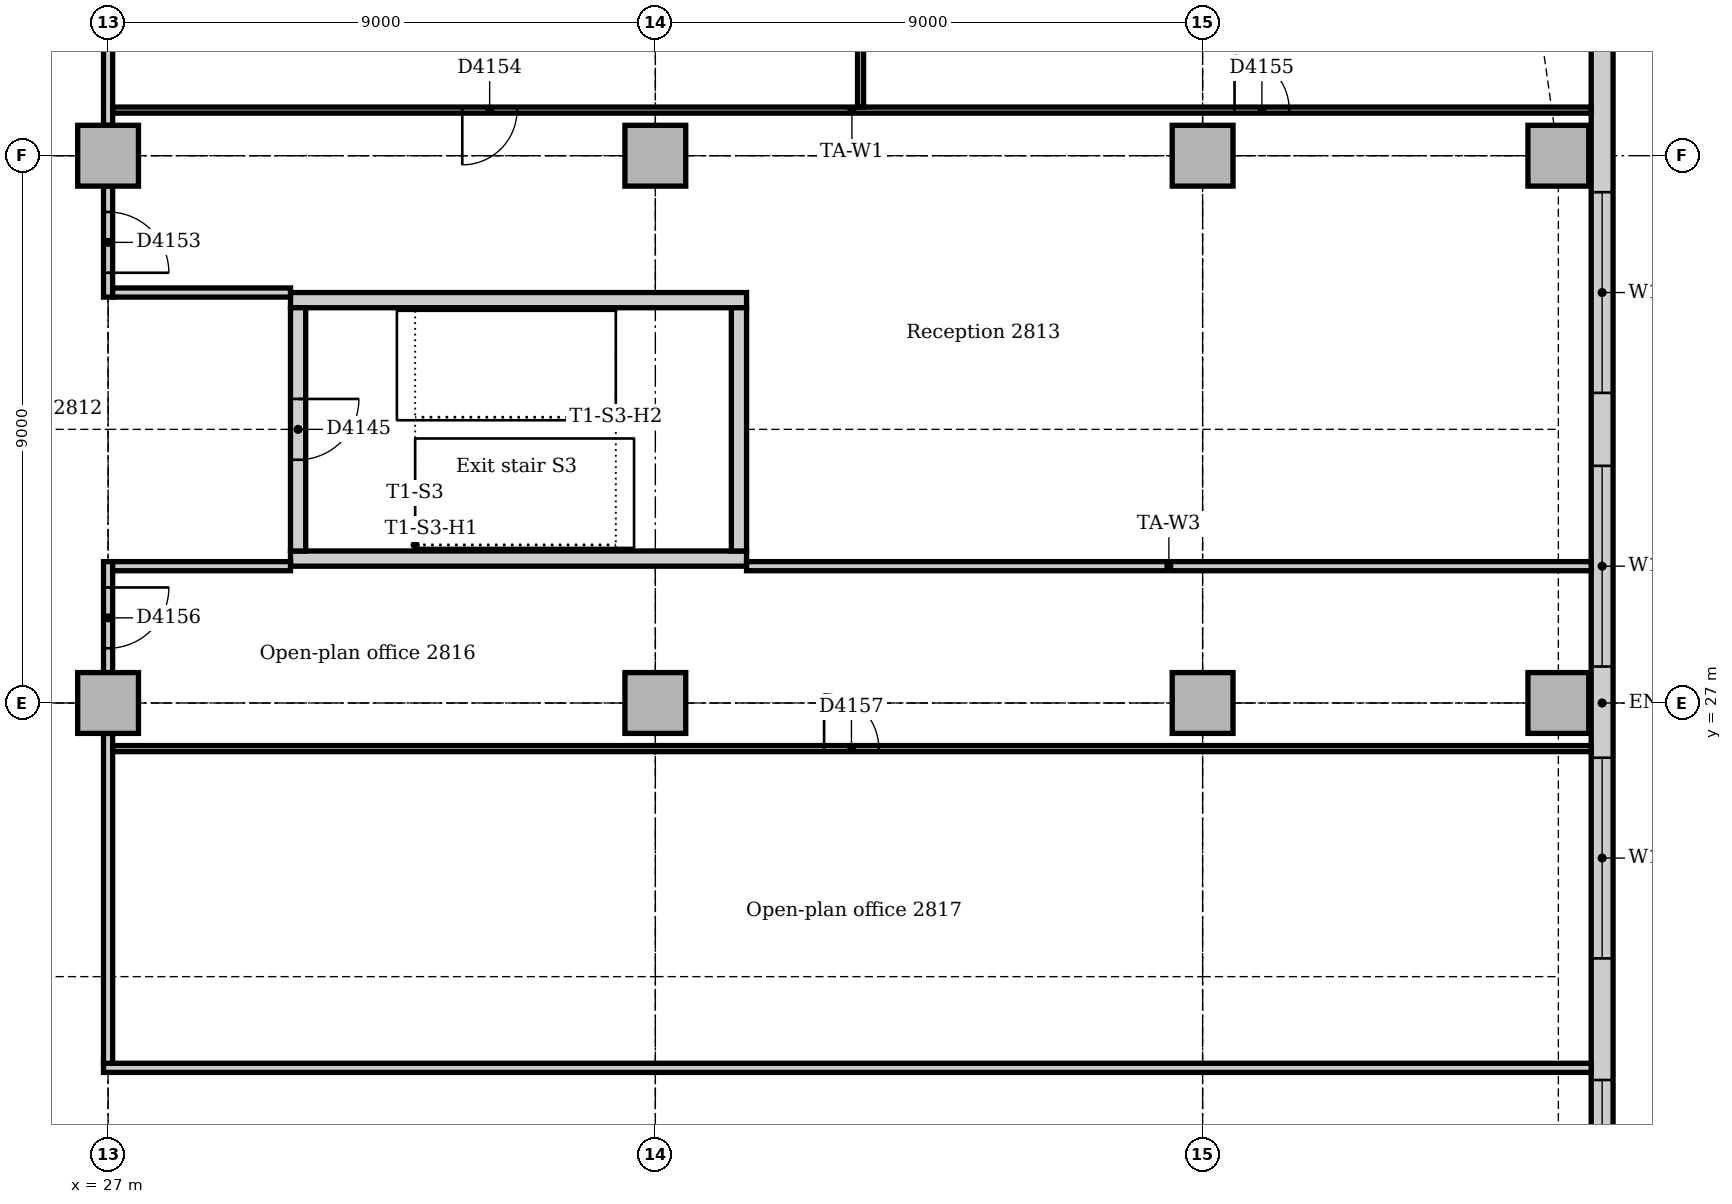
"""IFC4 building model, lengths in metres.
Left out: names, types, materials, properties, quantities, classifications, styles, units other than length and angle.
Written with IfcOpenShell. Run it as: python <this file> out.ifc"""

import sys

from ifc_helpers import new_model, si_unit, direction, frame, frame_2d, origin, origin_2d, place, context, subcontext, project, spatial, rectangle, extrude, element, fill, save


model = new_model("IFC4")
c1 = context("Model", 3, precision=1e-05, world=origin(), true_north=direction((0.0, 1.0)))
c2 = subcontext(c1, "Body", "Model", "MODEL_VIEW")
j1 = project(units=[si_unit("LENGTHUNIT", "METRE"), si_unit("PLANEANGLEUNIT", "RADIAN")], contexts=[c1])
p1 = place(None, origin())
s1 = spatial("IfcSite", under=j1, at=p1, CompositionType="ELEMENT")
p2 = place(p1, origin())
s2 = spatial("IfcBuilding", under=s1, at=p2, CompositionType="ELEMENT")
p3 = place(p2, frame((0.0, 0.0, 120.0)))
s3 = spatial("IfcBuildingStorey", under=s2, at=p3, CompositionType="ELEMENT", Elevation=120.0)
for number, where, z_axis, x_axis in (
    (1, (30.0, 29.375, 0.0), (0.0, 0.0, 1.0), (1.0, 0.0, 0.0)),
    (2, (37.5, 33.625, 0.0), (0.0, 0.0, 1.0), (-1.0, 0.0, 0.0)),
):
    element("IfcWall", number, at=place(p3, frame(where, z_axis=z_axis, x_axis=x_axis)), inside=s3, PredefinedType="SOLIDWALL", context=c2, shape_type="SweptSolid", body=[
        extrude(rectangle(XDim=7.5, YDim=0.25, at=frame_2d((3.75, 0.0))), origin(), (0.0, 0.0, 1.0), 4.0),
    ])
p4 = place(p3, frame((37.375, 29.5, 0.0), z_axis=(0.0, 0.0, 1.0), x_axis=(0.0, 1.0, 0.0)))
e3 = element("IfcWall", 3, at=p4, inside=s3, PredefinedType="SOLIDWALL", context=c2, shape_type="SweptSolid", body=[
    extrude(rectangle(XDim=4.0, YDim=0.25, at=frame_2d((2.0, 0.0))), origin(), (0.0, 0.0, 1.0), 4.0),
])
p5 = place(p3, frame((30.125, 33.5, 0.0), z_axis=(0.0, 0.0, 1.0), x_axis=(0.0, -1.0, 0.0)))
e4 = element("IfcWall", 4, at=p5, inside=s3, PredefinedType="SOLIDWALL", context=c2, shape_type="SweptSolid", body=[
    extrude(rectangle(XDim=4.0, YDim=0.25, at=frame_2d((2.0, 0.0))), origin(), (0.0, 0.0, 1.0), 4.0),
])
p6 = place(p5, frame((1.5, 0.0, 0.0)))
e5 = element("IfcOpeningElement", 5, at=p6, cuts=e4, PredefinedType="OPENING", context=c2, shape_type="SweptSolid", body=[
    extrude(rectangle(XDim=1.0, YDim=2.1, at=frame_2d((0.5, 1.05))), frame((0.0, 0.135, 0.0), z_axis=(0.0, -1.0, 0.0), x_axis=(1.0, 0.0, 0.0)), (0.0, 0.0, 1.0), 0.27),
])
for number, where, z_axis, x_axis in (
    (6, (50.85, 27.0, 0.0), (0.0, 0.0, 1.0), (1.0, 0.0, 0.0)),
    (7, (50.85, 36.0, 0.0), (0.0, 0.0, 1.0), (1.0, 0.0, 0.0)),
    (8, (27.0, 27.0, 0.0), (0.0, 0.0, 1.0), (1.0, 0.0, 0.0)),
    (9, (27.0, 36.0, 0.0), (0.0, 0.0, 1.0), (1.0, 0.0, 0.0)),
    (10, (36.0, 27.0, 0.0), (0.0, 0.0, 1.0), (1.0, 0.0, 0.0)),
    (11, (36.0, 36.0, 0.0), (0.0, 0.0, 1.0), (1.0, 0.0, 0.0)),
    (12, (45.0, 27.0, 0.0), (0.0, 0.0, 1.0), (1.0, 0.0, 0.0)),
    (13, (45.0, 36.0, 0.0), (0.0, 0.0, 1.0), (1.0, 0.0, 0.0)),
):
    element("IfcColumn", number, at=place(p3, frame(where, z_axis=z_axis, x_axis=x_axis)), inside=s3, PredefinedType="COLUMN", context=c2, shape_type="SweptSolid", body=[
        extrude(rectangle(XDim=1.0, YDim=1.0, at=origin_2d()), origin(), (0.0, 0.0, 1.0), 3.85),
    ])
p7 = place(p3, frame((51.57, 14.743, 0.0), z_axis=(0.0, 0.0, 1.0), x_axis=(0.0, 1.0, 0.0)))
e14 = element("IfcWall", 14, at=p7, inside=s3, PredefinedType="STANDARD", context=c2, shape_type="SweptSolid", body=[
    extrude(rectangle(XDim=24.515, YDim=0.36, at=frame_2d((12.257, 0.0))), origin(), (0.0, 0.0, 1.0), 3.85),
])
p8 = place(p7, frame((4.257, 0.0, 0.9)))
e15 = element("IfcOpeningElement", 15, at=p8, cuts=e14, PredefinedType="OPENING", context=c2, shape_type="SweptSolid", body=[
    extrude(rectangle(XDim=1.8, YDim=1.6, at=frame_2d((0.9, 0.8))), frame((0.0, 0.19, 0.0), z_axis=(0.0, -1.0, 0.0), x_axis=(1.0, 0.0, 0.0)), (0.0, 0.0, 1.0), 0.38),
])
p9 = place(p7, frame((8.057, 0.0, 0.9)))
e16 = element("IfcOpeningElement", 16, at=p9, cuts=e14, PredefinedType="OPENING", context=c2, shape_type="SweptSolid", body=[
    extrude(rectangle(XDim=3.3, YDim=1.6, at=frame_2d((1.65, 0.8))), frame((0.0, 0.19, 0.0), z_axis=(0.0, -1.0, 0.0), x_axis=(1.0, 0.0, 0.0)), (0.0, 0.0, 1.0), 0.38),
])
p10 = place(p7, frame((12.857, 0.0, 0.9)))
e17 = element("IfcOpeningElement", 17, at=p10, cuts=e14, PredefinedType="OPENING", context=c2, shape_type="SweptSolid", body=[
    extrude(rectangle(XDim=3.3, YDim=1.6, at=frame_2d((1.65, 0.8))), frame((0.0, 0.19, 0.0), z_axis=(0.0, -1.0, 0.0), x_axis=(1.0, 0.0, 0.0)), (0.0, 0.0, 1.0), 0.38),
])
p11 = place(p7, frame((17.357, 0.0, 0.9)))
e18 = element("IfcOpeningElement", 18, at=p11, cuts=e14, PredefinedType="OPENING", context=c2, shape_type="SweptSolid", body=[
    extrude(rectangle(XDim=3.3, YDim=1.6, at=frame_2d((1.65, 0.8))), frame((0.0, 0.19, 0.0), z_axis=(0.0, -1.0, 0.0), x_axis=(1.0, 0.0, 0.0)), (0.0, 0.0, 1.0), 0.38),
])
p12 = place(p3, frame((26.925, 21.0, 0.0), z_axis=(0.0, 0.0, 1.0), x_axis=(1.0, 0.0, 0.0)))
e19 = element("IfcWall", 19, at=p12, inside=s3, PredefinedType="PARTITIONING", context=c2, shape_type="SweptSolid", body=[
    extrude(rectangle(XDim=24.465, YDim=0.15, at=frame_2d((12.232, 0.0))), origin(), (0.0, 0.0, 1.0), 3.85),
])
p13 = place(p3, frame((27.0, 33.675, 0.0), z_axis=(0.0, 0.0, 1.0), x_axis=(0.0, 1.0, 0.0)))
e20 = element("IfcWall", 20, at=p13, inside=s3, PredefinedType="PARTITIONING", context=c2, shape_type="SweptSolid", body=[
    extrude(rectangle(XDim=1.825, YDim=0.15, at=frame_2d((0.912, 0.0))), origin(), (0.0, 0.0, 1.0), 3.256),
])
p14 = place(p13, frame((0.4, 0.0, 0.0)))
e21 = element("IfcOpeningElement", 21, at=p14, cuts=e20, PredefinedType="OPENING", context=c2, shape_type="SweptSolid", body=[
    extrude(rectangle(XDim=1.0, YDim=2.1, at=frame_2d((0.5, 1.05))), frame((0.0, 0.085, 0.0), z_axis=(0.0, -1.0, 0.0), x_axis=(1.0, 0.0, 0.0)), (0.0, 0.0, 1.0), 0.17),
])
p15 = place(p3, frame((27.0, 36.5, 0.0), z_axis=(0.0, 0.0, 1.0), x_axis=(0.0, 1.0, 0.0)))
e22 = element("IfcWall", 22, at=p15, inside=s3, PredefinedType="PARTITIONING", context=c2, shape_type="SweptSolid", body=[
    extrude(rectangle(XDim=7.1, YDim=0.15, at=frame_2d((3.55, 0.0))), origin(), (0.0, 0.0, 1.0), 3.256),
])
p16 = place(p3, frame((27.0, 21.075, 0.0), z_axis=(0.0, 0.0, 1.0), x_axis=(0.0, 1.0, 0.0)))
e23 = element("IfcWall", 23, at=p16, inside=s3, PredefinedType="PARTITIONING", context=c2, shape_type="SweptSolid", body=[
    extrude(rectangle(XDim=5.425, YDim=0.15, at=frame_2d((2.712, 0.0))), origin(), (0.0, 0.0, 1.0), 3.256),
])
p17 = place(p3, frame((27.0, 27.5, 0.0), z_axis=(0.0, 0.0, 1.0), x_axis=(0.0, 1.0, 0.0)))
e24 = element("IfcWall", 24, at=p17, inside=s3, PredefinedType="PARTITIONING", context=c2, shape_type="SweptSolid", body=[
    extrude(rectangle(XDim=1.825, YDim=0.15, at=frame_2d((0.912, 0.0))), origin(), (0.0, 0.0, 1.0), 3.256),
])
p18 = place(p17, frame((0.4, 0.0, 0.0)))
e25 = element("IfcOpeningElement", 25, at=p18, cuts=e24, PredefinedType="OPENING", context=c2, shape_type="SweptSolid", body=[
    extrude(rectangle(XDim=1.0, YDim=2.1, at=frame_2d((0.5, 1.05))), frame((0.0, 0.085, 0.0), z_axis=(0.0, -1.0, 0.0), x_axis=(1.0, 0.0, 0.0)), (0.0, 0.0, 1.0), 0.17),
])
for number, where, z_axis, x_axis in (
    (26, (27.075, 29.25, 0.0), (0.0, 0.0, 1.0), (1.0, 0.0, 0.0)),
    (27, (27.075, 33.75, 0.0), (0.0, 0.0, 1.0), (1.0, 0.0, 0.0)),
):
    element("IfcWall", number, at=place(p3, frame(where, z_axis=z_axis, x_axis=x_axis)), inside=s3, PredefinedType="PARTITIONING", context=c2, shape_type="SweptSolid", body=[
        extrude(rectangle(XDim=2.925, YDim=0.15, at=frame_2d((1.462, 0.0))), origin(), (0.0, 0.0, 1.0), 3.85),
    ])
p19 = place(p3, frame((37.5, 29.25, 0.0), z_axis=(0.0, 0.0, 1.0), x_axis=(1.0, 0.0, 0.0)))
e28 = element("IfcWall", 28, at=p19, inside=s3, PredefinedType="PARTITIONING", context=c2, shape_type="SweptSolid", body=[
    extrude(rectangle(XDim=13.89, YDim=0.15, at=frame_2d((6.945, 0.0))), origin(), (0.0, 0.0, 1.0), 3.85),
])
p20 = place(p3, frame((27.075, 26.25, 0.0), z_axis=(0.0, 0.0, 1.0), x_axis=(1.0, 0.0, 0.0)))
e29 = element("IfcWall", 29, at=p20, inside=s3, PredefinedType="PARTITIONING", context=c2, shape_type="SweptSolid", body=[
    extrude(rectangle(XDim=24.315, YDim=0.1, at=frame_2d((12.158, 0.0))), origin(), (0.0, 0.0, 1.0), 3.85),
])
p21 = place(p20, frame((11.7, 0.0, 0.0)))
e30 = element("IfcOpeningElement", 30, at=p21, cuts=e29, PredefinedType="OPENING", context=c2, shape_type="SweptSolid", body=[
    extrude(rectangle(XDim=0.9, YDim=2.1, at=frame_2d((0.45, 1.05))), frame((0.0, 0.06, 0.0), z_axis=(0.0, -1.0, 0.0), x_axis=(1.0, 0.0, 0.0)), (0.0, 0.0, 1.0), 0.12),
])
p22 = place(p3, frame((27.075, 36.75, 0.0), z_axis=(0.0, 0.0, 1.0), x_axis=(1.0, 0.0, 0.0)))
e31 = element("IfcWall", 31, at=p22, inside=s3, PredefinedType="PARTITIONING", context=c2, shape_type="SweptSolid", body=[
    extrude(rectangle(XDim=24.315, YDim=0.1, at=frame_2d((12.158, 0.0))), origin(), (0.0, 0.0, 1.0), 3.85),
])
p23 = place(p22, frame((5.75, 0.0, 0.0)))
e32 = element("IfcOpeningElement", 32, at=p23, cuts=e31, PredefinedType="OPENING", context=c2, shape_type="SweptSolid", body=[
    extrude(rectangle(XDim=0.9, YDim=2.1, at=frame_2d((0.45, 1.05))), frame((0.0, 0.06, 0.0), z_axis=(0.0, -1.0, 0.0), x_axis=(1.0, 0.0, 0.0)), (0.0, 0.0, 1.0), 0.12),
])
p24 = place(p22, frame((18.45, 0.0, 0.0)))
e33 = element("IfcOpeningElement", 33, at=p24, cuts=e31, PredefinedType="OPENING", context=c2, shape_type="SweptSolid", body=[
    extrude(rectangle(XDim=0.9, YDim=2.1, at=frame_2d((0.45, 1.05))), frame((0.0, 0.06, 0.0), z_axis=(0.0, -1.0, 0.0), x_axis=(1.0, 0.0, 0.0)), (0.0, 0.0, 1.0), 0.12),
])
p25 = place(p3, frame((39.375, 36.8, 0.0), z_axis=(0.0, 0.0, 1.0), x_axis=(0.0, 1.0, 0.0)))
e34 = element("IfcWall", 34, at=p25, inside=s3, PredefinedType="PARTITIONING", context=c2, shape_type="SweptSolid", body=[
    extrude(rectangle(XDim=12.34, YDim=0.1, at=frame_2d((6.17, 0.0))), origin(), (0.0, 0.0, 1.0), 3.85),
])
p26 = place(p8, origin())
e35 = element("IfcWindow", 35, at=p26, inside=s3, PartitioningType="SINGLE_PANEL", PredefinedType="WINDOW", context=c2, shape_type="SweptSolid", body=[
    extrude(rectangle(XDim=1.8, YDim=1.6, at=frame_2d((0.9, 0.8))), frame((0.0, 0.13, 0.0), z_axis=(0.0, -1.0, 0.0), x_axis=(1.0, 0.0, 0.0)), (0.0, 0.0, 1.0), 0.06),
])
fill(e15, e35)
p27 = place(p9, origin())
e36 = element("IfcWindow", 36, at=p27, inside=s3, PartitioningType="SINGLE_PANEL", PredefinedType="WINDOW", context=c2, shape_type="SweptSolid", body=[
    extrude(rectangle(XDim=3.3, YDim=1.6, at=frame_2d((1.65, 0.8))), frame((0.0, 0.13, 0.0), z_axis=(0.0, -1.0, 0.0), x_axis=(1.0, 0.0, 0.0)), (0.0, 0.0, 1.0), 0.06),
])
fill(e16, e36)
p28 = place(p10, origin())
e37 = element("IfcWindow", 37, at=p28, inside=s3, PartitioningType="SINGLE_PANEL", PredefinedType="WINDOW", context=c2, shape_type="SweptSolid", body=[
    extrude(rectangle(XDim=3.3, YDim=1.6, at=frame_2d((1.65, 0.8))), frame((0.0, 0.13, 0.0), z_axis=(0.0, -1.0, 0.0), x_axis=(1.0, 0.0, 0.0)), (0.0, 0.0, 1.0), 0.06),
])
fill(e17, e37)
p29 = place(p11, origin())
e38 = element("IfcWindow", 38, at=p29, inside=s3, PartitioningType="SINGLE_PANEL", PredefinedType="WINDOW", context=c2, shape_type="SweptSolid", body=[
    extrude(rectangle(XDim=3.3, YDim=1.6, at=frame_2d((1.65, 0.8))), frame((0.0, 0.13, 0.0), z_axis=(0.0, -1.0, 0.0), x_axis=(1.0, 0.0, 0.0)), (0.0, 0.0, 1.0), 0.06),
])
fill(e18, e38)
p30 = place(p6, origin())
e39 = element("IfcDoor", 39, at=p30, inside=s3, OperationType="SINGLE_SWING_LEFT", PredefinedType="DOOR", context=c2, shape_type="SweptSolid", body=[
    extrude(rectangle(XDim=1.0, YDim=2.1, at=frame_2d((0.5, 1.05))), frame((0.0, 0.025, 0.0), z_axis=(0.0, -1.0, 0.0), x_axis=(1.0, 0.0, 0.0)), (0.0, 0.0, 1.0), 0.05),
])
fill(e5, e39)
p31 = place(p14, frame((1.0, 0.0, 0.0), z_axis=(0.0, 0.0, 1.0), x_axis=(-1.0, 0.0, 0.0)))
e40 = element("IfcDoor", 40, at=p31, inside=s3, OperationType="SINGLE_SWING_RIGHT", PredefinedType="DOOR", context=c2, shape_type="SweptSolid", body=[
    extrude(rectangle(XDim=1.0, YDim=2.1, at=frame_2d((0.5, 1.05))), frame((0.0, 0.025, 0.0), z_axis=(0.0, -1.0, 0.0), x_axis=(1.0, 0.0, 0.0)), (0.0, 0.0, 1.0), 0.05),
])
fill(e21, e40)
p32 = place(p23, frame((0.9, 0.0, 0.0), z_axis=(0.0, 0.0, 1.0), x_axis=(-1.0, 0.0, 0.0)))
e41 = element("IfcDoor", 41, at=p32, inside=s3, OperationType="SINGLE_SWING_RIGHT", PredefinedType="DOOR", context=c2, shape_type="SweptSolid", body=[
    extrude(rectangle(XDim=0.9, YDim=2.1, at=frame_2d((0.45, 1.05))), frame((0.0, 0.025, 0.0), z_axis=(0.0, -1.0, 0.0), x_axis=(1.0, 0.0, 0.0)), (0.0, 0.0, 1.0), 0.05),
])
fill(e32, e41)
p33 = place(p24, origin())
e42 = element("IfcDoor", 42, at=p33, inside=s3, OperationType="SINGLE_SWING_LEFT", PredefinedType="DOOR", context=c2, shape_type="SweptSolid", body=[
    extrude(rectangle(XDim=0.9, YDim=2.1, at=frame_2d((0.45, 1.05))), frame((0.0, 0.025, 0.0), z_axis=(0.0, -1.0, 0.0), x_axis=(1.0, 0.0, 0.0)), (0.0, 0.0, 1.0), 0.05),
])
fill(e33, e42)
p34 = place(p18, frame((1.0, 0.0, 0.0), z_axis=(0.0, 0.0, 1.0), x_axis=(-1.0, 0.0, 0.0)))
e43 = element("IfcDoor", 43, at=p34, inside=s3, OperationType="SINGLE_SWING_LEFT", PredefinedType="DOOR", context=c2, shape_type="SweptSolid", body=[
    extrude(rectangle(XDim=1.0, YDim=2.1, at=frame_2d((0.5, 1.05))), frame((0.0, 0.025, 0.0), z_axis=(0.0, -1.0, 0.0), x_axis=(1.0, 0.0, 0.0)), (0.0, 0.0, 1.0), 0.05),
])
fill(e25, e43)
p35 = place(p21, origin())
e44 = element("IfcDoor", 44, at=p35, inside=s3, OperationType="SINGLE_SWING_LEFT", PredefinedType="DOOR", context=c2, shape_type="SweptSolid", body=[
    extrude(rectangle(XDim=0.9, YDim=2.1, at=frame_2d((0.45, 1.05))), frame((0.0, 0.025, 0.0), z_axis=(0.0, -1.0, 0.0), x_axis=(1.0, 0.0, 0.0)), (0.0, 0.0, 1.0), 0.05),
])
fill(e30, e44)
save(model, sys.argv[1])
